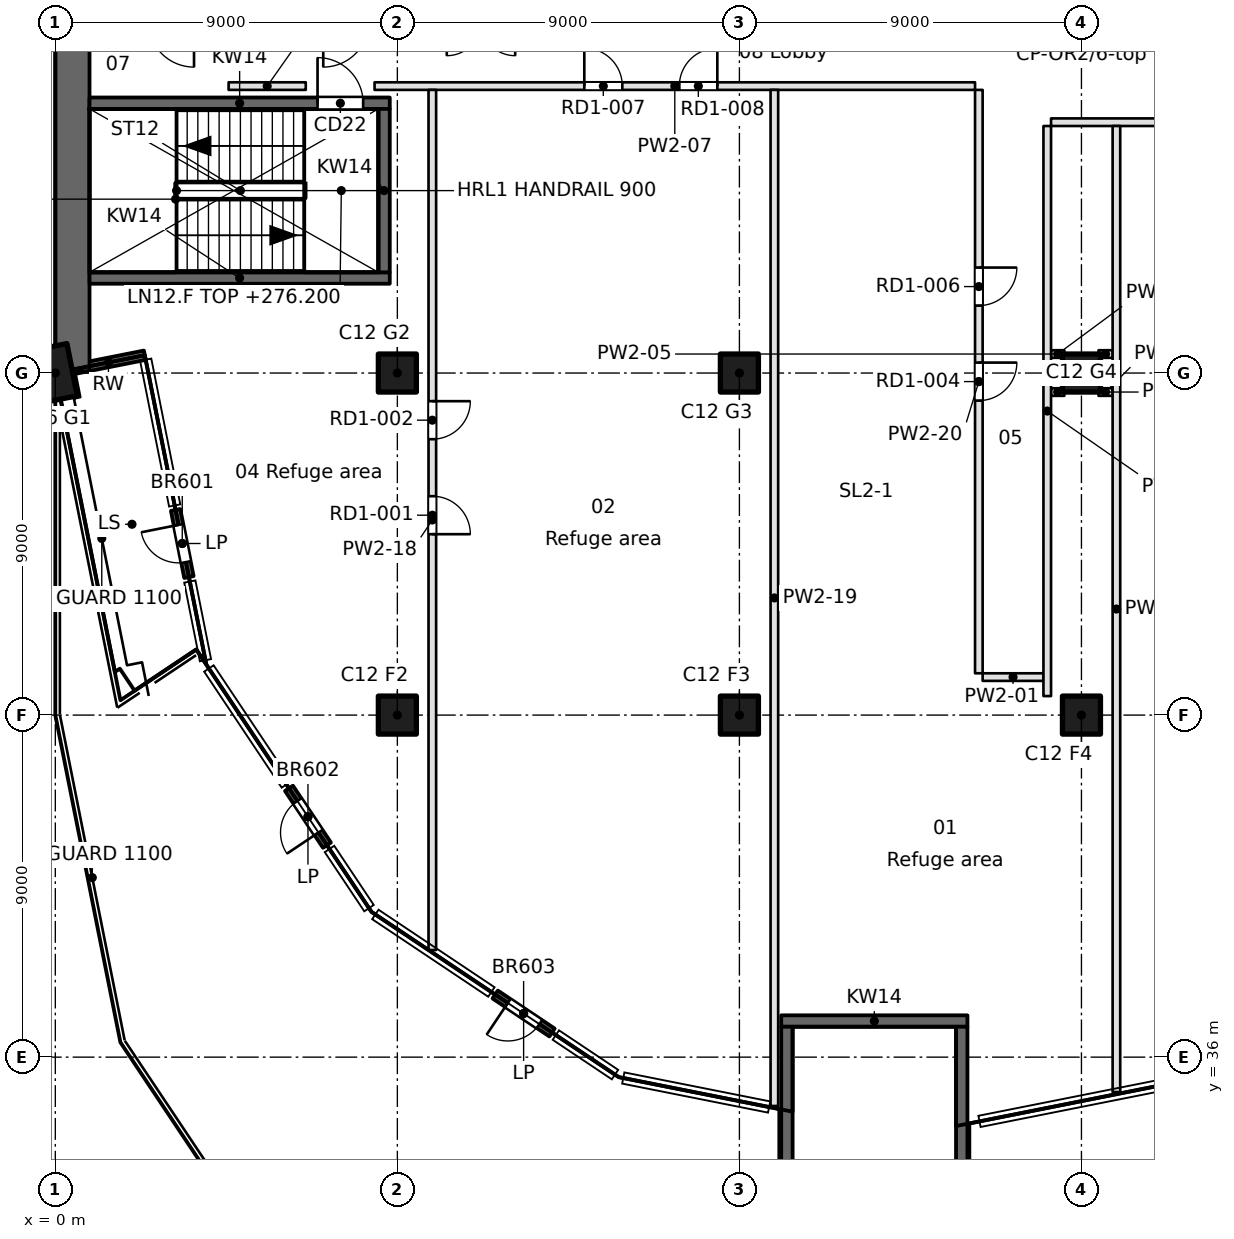
"""IFC4 building model, lengths in metres.
Left out: names, types, materials, properties, quantities, classifications, styles, units other than length and angle.
Written with IfcOpenShell. Run it as: python <this file> out.ifc"""

import sys

from ifc_helpers import new_model, si_unit, direction, frame, frame_2d, origin, origin_2d, place, context, subcontext, project, spatial, rectangle, extrude, element, fill, save


model = new_model("IFC4")
c1 = context("Model", 3, precision=1e-05, world=origin(), true_north=direction((0.0, 1.0)))
c2 = subcontext(c1, "Body", "Model", "MODEL_VIEW")
j1 = project(units=[si_unit("LENGTHUNIT", "METRE"), si_unit("PLANEANGLEUNIT", "RADIAN")], contexts=[c1])
p1 = place(None, origin())
s1 = spatial("IfcSite", under=j1, at=p1, CompositionType="ELEMENT")
p2 = place(p1, origin())
s2 = spatial("IfcBuilding", under=s1, at=p2, CompositionType="ELEMENT")
p3 = place(p2, frame((0.0, 0.0, 276.2)))
s3 = spatial("IfcBuildingStorey", under=s2, at=p3, CompositionType="ELEMENT", Elevation=276.2)
p4 = place(p3, frame((0.0, 54.0, 0.0), z_axis=(0.0, 0.0, 1.0), x_axis=(-0.195090322016, 0.980785280403, 0.0)))
e1 = element("IfcColumn", 1, at=p4, inside=s3, PredefinedType="COLUMN", context=c2, shape_type="SweptSolid", body=[
    extrude(rectangle(XDim=1.4, YDim=0.9, at=origin_2d()), origin(), (0.0, 0.0, 1.0), 4.6),
])
for number, where, z_axis, x_axis in (
    (2, (9.0, 45.0, 0.0), (0.0, 0.0, 1.0), (1.0, 0.0, 0.0)),
    (3, (9.0, 54.0, 0.0), (0.0, 0.0, 1.0), (1.0, 0.0, 0.0)),
    (4, (18.0, 45.0, 0.0), (0.0, 0.0, 1.0), (1.0, 0.0, 0.0)),
    (5, (18.0, 54.0, 0.0), (0.0, 0.0, 1.0), (1.0, 0.0, 0.0)),
    (6, (27.0, 45.0, 0.0), (0.0, 0.0, 1.0), (1.0, 0.0, 0.0)),
    (7, (27.0, 54.0, 0.0), (0.0, 0.0, 1.0), (1.0, 0.0, 0.0)),
):
    element("IfcColumn", number, at=place(p3, frame(where, z_axis=z_axis, x_axis=x_axis)), inside=s3, PredefinedType="COLUMN", context=c2, shape_type="SweptSolid", body=[
        extrude(rectangle(XDim=1.0, YDim=1.0, at=origin_2d()), origin(), (0.0, 0.0, 1.0), 4.6),
    ])
p5 = place(p3, frame((0.45, 94.5, 0.0), z_axis=(0.0, 0.0, 1.0), x_axis=(0.0, -1.0, 0.0)))
e8 = element("IfcWall", 8, at=p5, inside=s3, PredefinedType="SHEAR", context=c2, shape_type="SweptSolid", body=[
    extrude(rectangle(XDim=40.456, YDim=0.9, at=frame_2d((20.228, 0.0))), origin(), (0.0, 0.0, 1.0), 4.6),
])
p6 = place(p3, frame((0.441, 54.089, 0.0), z_axis=(0.0, 0.0, 1.0), x_axis=(0.980834936053, 0.194840519958, 0.0)))
e9 = element("IfcWall", 9, at=p6, inside=s3, PredefinedType="SOLIDWALL", context=c2, shape_type="SweptSolid", body=[
    extrude(rectangle(XDim=1.951, YDim=0.25, at=frame_2d((0.976, 0.0))), origin(), (0.0, 0.0, 1.0), 4.2),
])
p7 = place(p3, frame((3.165, 50.397, 0.0), z_axis=(0.0, 0.0, 1.0), x_axis=(0.19517704197, -0.980768026746, 0.0)))
e10 = element("IfcWall", 10, at=p7, inside=s3, PredefinedType="SOLIDWALL", context=c2, shape_type="SweptSolid", body=[
    extrude(rectangle(XDim=1.8, YDim=0.25, at=frame_2d((0.9, 0.0))), origin(), (0.0, 0.0, 1.0), 4.2),
])
p8 = place(p7, frame((0.4, 0.0, 0.0)))
e11 = element("IfcOpeningElement", 11, at=p8, cuts=e10, PredefinedType="OPENING", context=c2, shape_type="SweptSolid", body=[
    extrude(rectangle(XDim=1.0, YDim=2.1, at=frame_2d((0.5, 1.05))), frame((0.0, 0.125, 0.0), z_axis=(0.0, -1.0, 0.0), x_axis=(1.0, 0.0, 0.0)), (0.0, 0.0, 1.0), 0.25),
])
p9 = place(p3, frame((6.148, 43.074, 0.0), z_axis=(0.0, 0.0, 1.0), x_axis=(0.555576323502, -0.83146554274, 0.0)))
e12 = element("IfcWall", 12, at=p9, inside=s3, PredefinedType="SOLIDWALL", context=c2, shape_type="SweptSolid", body=[
    extrude(rectangle(XDim=1.8, YDim=0.25, at=frame_2d((0.9, 0.0))), origin(), (0.0, 0.0, 1.0), 4.2),
])
p10 = place(p9, frame((0.4, 0.0, 0.0)))
e13 = element("IfcOpeningElement", 13, at=p10, cuts=e12, PredefinedType="OPENING", context=c2, shape_type="SweptSolid", body=[
    extrude(rectangle(XDim=1.0, YDim=2.1, at=frame_2d((0.5, 1.05))), frame((0.0, 0.125, 0.0), z_axis=(0.0, -1.0, 0.0), x_axis=(1.0, 0.0, 0.0)), (0.0, 0.0, 1.0), 0.25),
])
p11 = place(p3, frame((11.574, 37.648, 0.0), z_axis=(0.0, 0.0, 1.0), x_axis=(0.83146554274, -0.555576323502, 0.0)))
e14 = element("IfcWall", 14, at=p11, inside=s3, PredefinedType="SOLIDWALL", context=c2, shape_type="SweptSolid", body=[
    extrude(rectangle(XDim=1.8, YDim=0.25, at=frame_2d((0.9, 0.0))), origin(), (0.0, 0.0, 1.0), 4.2),
])
p12 = place(p11, frame((0.4, 0.0, 0.0)))
e15 = element("IfcOpeningElement", 15, at=p12, cuts=e14, PredefinedType="OPENING", context=c2, shape_type="SweptSolid", body=[
    extrude(rectangle(XDim=1.0, YDim=2.1, at=frame_2d((0.5, 1.05))), frame((0.0, 0.125, 0.0), z_axis=(0.0, -1.0, 0.0), x_axis=(1.0, 0.0, 0.0)), (0.0, 0.0, 1.0), 0.25),
])
p13 = place(p3, frame((19.1, 36.95, -0.45), z_axis=(0.0, 0.0, 1.0), x_axis=(1.0, 0.0, 0.0)))
e16 = element("IfcWall", 16, at=p13, inside=s3, PredefinedType="SOLIDWALL", context=c2, shape_type="SweptSolid", body=[
    extrude(rectangle(XDim=4.9, YDim=0.3, at=frame_2d((2.45, 0.0))), origin(), (0.0, 0.0, 1.0), 4.65),
])
p14 = place(p3, frame((0.9, 56.5, -0.45), z_axis=(0.0, 0.0, 1.0), x_axis=(1.0, 0.0, 0.0)))
e17 = element("IfcWall", 17, at=p14, inside=s3, PredefinedType="SOLIDWALL", context=c2, shape_type="SweptSolid", body=[
    extrude(rectangle(XDim=7.9, YDim=0.3, at=frame_2d((3.95, 0.0))), origin(), (0.0, 0.0, 1.0), 4.65),
])
p15 = place(p3, frame((0.9, 61.1, -0.45), z_axis=(0.0, 0.0, 1.0), x_axis=(1.0, 0.0, 0.0)))
e18 = element("IfcWall", 18, at=p15, inside=s3, PredefinedType="SOLIDWALL", context=c2, shape_type="SweptSolid", body=[
    extrude(rectangle(XDim=7.9, YDim=0.3, at=frame_2d((3.95, 0.0))), origin(), (0.0, 0.0, 1.0), 4.65),
])
p16 = place(p15, frame((6.0, 0.0, 0.45)))
e19 = element("IfcOpeningElement", 19, at=p16, cuts=e18, PredefinedType="OPENING", context=c2, shape_type="SweptSolid", body=[
    extrude(rectangle(XDim=1.2, YDim=2.1, at=frame_2d((0.6, 1.05))), frame((0.0, 0.15, 0.0), z_axis=(0.0, -1.0, 0.0), x_axis=(1.0, 0.0, 0.0)), (0.0, 0.0, 1.0), 0.3),
])
p17 = place(p3, frame((8.65, 56.65, -0.45), z_axis=(0.0, 0.0, 1.0), x_axis=(0.0, 1.0, 0.0)))
e20 = element("IfcWall", 20, at=p17, inside=s3, PredefinedType="SOLIDWALL", context=c2, shape_type="SweptSolid", body=[
    extrude(rectangle(XDim=4.3, YDim=0.3, at=frame_2d((2.15, 0.0))), origin(), (0.0, 0.0, 1.0), 4.65),
])
p18 = place(p3, frame((19.25, 29.2, -0.45), z_axis=(0.0, 0.0, 1.0), x_axis=(0.0, 1.0, 0.0)))
e21 = element("IfcWall", 21, at=p18, inside=s3, PredefinedType="SOLIDWALL", context=c2, shape_type="SweptSolid", body=[
    extrude(rectangle(XDim=7.6, YDim=0.3, at=frame_2d((3.8, 0.0))), origin(), (0.0, 0.0, 1.0), 4.65),
])
p19 = place(p3, frame((23.85, 29.2, -0.45), z_axis=(0.0, 0.0, 1.0), x_axis=(0.0, 1.0, 0.0)))
e22 = element("IfcWall", 22, at=p19, inside=s3, PredefinedType="SOLIDWALL", context=c2, shape_type="SweptSolid", body=[
    extrude(rectangle(XDim=7.6, YDim=0.3, at=frame_2d((3.8, 0.0))), origin(), (0.0, 0.0, 1.0), 4.65),
])
p20 = place(p19, frame((0.375, 0.0, 0.45)))
e23 = element("IfcOpeningElement", 23, at=p20, cuts=e22, PredefinedType="OPENING", context=c2, shape_type="SweptSolid", body=[
    extrude(rectangle(XDim=1.2, YDim=2.1, at=frame_2d((0.6, 1.05))), frame((0.0, 0.15, 0.0), z_axis=(0.0, -1.0, 0.0), x_axis=(1.0, 0.0, 0.0)), (0.0, 0.0, 1.0), 0.3),
])
p21 = place(p3, frame((26.0, 46.0, 0.0), z_axis=(0.0, 0.0, 1.0), x_axis=(-1.0, 0.0, 0.0)))
e24 = element("IfcWall", 24, at=p21, inside=s3, PredefinedType="PARTITIONING", context=c2, shape_type="SweptSolid", body=[
    extrude(rectangle(XDim=1.6, YDim=0.2, at=frame_2d((0.8, 0.0))), origin(), (0.0, 0.0, 1.0), 4.2),
])
p22 = place(p3, frame((26.2, 53.5, 0.0), z_axis=(0.0, 0.0, 1.0), x_axis=(1.0, 0.0, 0.0)))
e25 = element("IfcWall", 25, at=p22, inside=s3, PredefinedType="PARTITIONING", context=c2, shape_type="SweptSolid", body=[
    extrude(rectangle(XDim=0.35, YDim=0.2, at=frame_2d((0.175, 0.0))), origin(), (0.0, 0.0, 1.0), 4.2),
])
p23 = place(p3, frame((27.45, 53.5, 0.0), z_axis=(0.0, 0.0, 1.0), x_axis=(1.0, 0.0, 0.0)))
e26 = element("IfcWall", 26, at=p23, inside=s3, PredefinedType="PARTITIONING", context=c2, shape_type="SweptSolid", body=[
    extrude(rectangle(XDim=0.37, YDim=0.2, at=frame_2d((0.185, 0.0))), origin(), (0.0, 0.0, 1.0), 4.2),
])
p24 = place(p3, frame((26.2, 54.5, 0.0), z_axis=(0.0, 0.0, 1.0), x_axis=(1.0, 0.0, 0.0)))
e27 = element("IfcWall", 27, at=p24, inside=s3, PredefinedType="PARTITIONING", context=c2, shape_type="SweptSolid", body=[
    extrude(rectangle(XDim=0.35, YDim=0.2, at=frame_2d((0.175, 0.0))), origin(), (0.0, 0.0, 1.0), 4.2),
])
p25 = place(p3, frame((27.45, 54.5, 0.0), z_axis=(0.0, 0.0, 1.0), x_axis=(1.0, 0.0, 0.0)))
e28 = element("IfcWall", 28, at=p25, inside=s3, PredefinedType="PARTITIONING", context=c2, shape_type="SweptSolid", body=[
    extrude(rectangle(XDim=0.37, YDim=0.2, at=frame_2d((0.185, 0.0))), origin(), (0.0, 0.0, 1.0), 4.2),
])
p26 = place(p3, frame((40.611, 60.6, 0.0), z_axis=(0.0, 0.0, 1.0), x_axis=(-1.0, 0.0, 0.0)))
e29 = element("IfcWall", 29, at=p26, inside=s3, PredefinedType="PARTITIONING", context=c2, shape_type="SweptSolid", body=[
    extrude(rectangle(XDim=14.411, YDim=0.2, at=frame_2d((7.206, 0.0))), origin(), (0.0, 0.0, 1.0), 4.2),
])
p27 = place(p3, frame((24.2, 61.55, 0.0), z_axis=(0.0, 0.0, 1.0), x_axis=(-1.0, 0.0, 0.0)))
e30 = element("IfcWall", 30, at=p27, inside=s3, PredefinedType="PARTITIONING", context=c2, shape_type="SweptSolid", body=[
    extrude(rectangle(XDim=15.8, YDim=0.2, at=frame_2d((7.9, 0.0))), origin(), (0.0, 0.0, 1.0), 4.2),
])
p28 = place(p27, frame((9.281, 0.0, 0.0)))
e31 = element("IfcOpeningElement", 31, at=p28, cuts=e30, PredefinedType="OPENING", context=c2, shape_type="SweptSolid", body=[
    extrude(rectangle(XDim=1.0, YDim=2.1, at=frame_2d((0.5, 1.05))), frame((0.0, 0.1, 0.0), z_axis=(0.0, -1.0, 0.0), x_axis=(1.0, 0.0, 0.0)), (0.0, 0.0, 1.0), 0.2),
])
p29 = place(p27, frame((6.781, 0.0, 0.0)))
e32 = element("IfcOpeningElement", 32, at=p29, cuts=e30, PredefinedType="OPENING", context=c2, shape_type="SweptSolid", body=[
    extrude(rectangle(XDim=1.0, YDim=2.1, at=frame_2d((0.5, 1.05))), frame((0.0, 0.1, 0.0), z_axis=(0.0, -1.0, 0.0), x_axis=(1.0, 0.0, 0.0)), (0.0, 0.0, 1.0), 0.2),
])
p30 = place(p3, frame((6.59, 61.55, 0.0), z_axis=(0.0, 0.0, 1.0), x_axis=(-1.0, 0.0, 0.0)))
e33 = element("IfcWall", 33, at=p30, inside=s3, PredefinedType="PARTITIONING", context=c2, shape_type="SweptSolid", body=[
    extrude(rectangle(XDim=2.03, YDim=0.2, at=frame_2d((1.015, 0.0))), origin(), (0.0, 0.0, 1.0), 4.2),
])
p31 = place(p3, frame((9.92, 38.818, 0.0), z_axis=(0.0, 0.0, 1.0), x_axis=(0.0, 1.0, 0.0)))
e34 = element("IfcWall", 34, at=p31, inside=s3, PredefinedType="PARTITIONING", context=c2, shape_type="SweptSolid", body=[
    extrude(rectangle(XDim=22.632, YDim=0.2, at=frame_2d((11.316, 0.0))), origin(), (0.0, 0.0, 1.0), 4.2),
])
p32 = place(p31, frame((10.942, 0.0, 0.0)))
e35 = element("IfcOpeningElement", 35, at=p32, cuts=e34, PredefinedType="OPENING", context=c2, shape_type="SweptSolid", body=[
    extrude(rectangle(XDim=1.0, YDim=2.1, at=frame_2d((0.5, 1.05))), frame((0.0, 0.1, 0.0), z_axis=(0.0, -1.0, 0.0), x_axis=(1.0, 0.0, 0.0)), (0.0, 0.0, 1.0), 0.2),
])
p33 = place(p31, frame((13.442, 0.0, 0.0)))
e36 = element("IfcOpeningElement", 36, at=p33, cuts=e34, PredefinedType="OPENING", context=c2, shape_type="SweptSolid", body=[
    extrude(rectangle(XDim=1.0, YDim=2.1, at=frame_2d((0.5, 1.05))), frame((0.0, 0.1, 0.0), z_axis=(0.0, -1.0, 0.0), x_axis=(1.0, 0.0, 0.0)), (0.0, 0.0, 1.0), 0.2),
])
p34 = place(p3, frame((18.92, 61.45, 0.0), z_axis=(0.0, 0.0, 1.0), x_axis=(0.0, -1.0, 0.0)))
e37 = element("IfcWall", 37, at=p34, inside=s3, PredefinedType="PARTITIONING", context=c2, shape_type="SweptSolid", body=[
    extrude(rectangle(XDim=26.735, YDim=0.2, at=frame_2d((13.367, 0.0))), origin(), (0.0, 0.0, 1.0), 4.2),
])
p35 = place(p3, frame((24.3, 46.1, 0.0), z_axis=(0.0, 0.0, 1.0), x_axis=(0.0, 1.0, 0.0)))
e38 = element("IfcWall", 38, at=p35, inside=s3, PredefinedType="PARTITIONING", context=c2, shape_type="SweptSolid", body=[
    extrude(rectangle(XDim=15.35, YDim=0.2, at=frame_2d((7.675, 0.0))), origin(), (0.0, 0.0, 1.0), 4.2),
])
p36 = place(p35, frame((7.175, 0.0, 0.0)))
e39 = element("IfcOpeningElement", 39, at=p36, cuts=e38, PredefinedType="OPENING", context=c2, shape_type="SweptSolid", body=[
    extrude(rectangle(XDim=1.0, YDim=2.1, at=frame_2d((0.5, 1.05))), frame((0.0, 0.1, 0.0), z_axis=(0.0, -1.0, 0.0), x_axis=(1.0, 0.0, 0.0)), (0.0, 0.0, 1.0), 0.2),
])
p37 = place(p35, frame((9.675, 0.0, 0.0)))
e40 = element("IfcOpeningElement", 40, at=p37, cuts=e38, PredefinedType="OPENING", context=c2, shape_type="SweptSolid", body=[
    extrude(rectangle(XDim=1.0, YDim=2.1, at=frame_2d((0.5, 1.05))), frame((0.0, 0.1, 0.0), z_axis=(0.0, -1.0, 0.0), x_axis=(1.0, 0.0, 0.0)), (0.0, 0.0, 1.0), 0.2),
])
p38 = place(p3, frame((26.1, 60.5, 0.0), z_axis=(0.0, 0.0, 1.0), x_axis=(0.0, -1.0, 0.0)))
e41 = element("IfcWall", 41, at=p38, inside=s3, PredefinedType="PARTITIONING", context=c2, shape_type="SweptSolid", body=[
    extrude(rectangle(XDim=15.0, YDim=0.2, at=frame_2d((7.5, 0.0))), origin(), (0.0, 0.0, 1.0), 4.2),
])
p39 = place(p3, frame((27.92, 60.5, 0.0), z_axis=(0.0, 0.0, 1.0), x_axis=(0.0, -1.0, 0.0)))
e42 = element("IfcWall", 42, at=p39, inside=s3, PredefinedType="PARTITIONING", context=c2, shape_type="SweptSolid", body=[
    extrude(rectangle(XDim=25.419, YDim=0.2, at=frame_2d((12.709, 0.0))), origin(), (0.0, 0.0, 1.0), 4.2),
])
p40 = place(p8, frame((1.0, 0.0, 0.0), z_axis=(0.0, 0.0, 1.0), x_axis=(-1.0, 0.0, 0.0)))
e43 = element("IfcDoor", 43, at=p40, inside=s3, OperationType="SINGLE_SWING_RIGHT", PredefinedType="DOOR", context=c2, shape_type="SweptSolid", body=[
    extrude(rectangle(XDim=1.0, YDim=2.1, at=frame_2d((0.5, 1.05))), frame((0.0, 0.025, 0.0), z_axis=(0.0, -1.0, 0.0), x_axis=(1.0, 0.0, 0.0)), (0.0, 0.0, 1.0), 0.05),
])
fill(e11, e43)
p41 = place(p10, frame((1.0, 0.0, 0.0), z_axis=(0.0, 0.0, 1.0), x_axis=(-1.0, 0.0, 0.0)))
e44 = element("IfcDoor", 44, at=p41, inside=s3, OperationType="SINGLE_SWING_LEFT", PredefinedType="DOOR", context=c2, shape_type="SweptSolid", body=[
    extrude(rectangle(XDim=1.0, YDim=2.1, at=frame_2d((0.5, 1.05))), frame((0.0, 0.025, 0.0), z_axis=(0.0, -1.0, 0.0), x_axis=(1.0, 0.0, 0.0)), (0.0, 0.0, 1.0), 0.05),
])
fill(e13, e44)
p42 = place(p12, frame((1.0, 0.0, 0.0), z_axis=(0.0, 0.0, 1.0), x_axis=(-1.0, 0.0, 0.0)))
e45 = element("IfcDoor", 45, at=p42, inside=s3, OperationType="SINGLE_SWING_RIGHT", PredefinedType="DOOR", context=c2, shape_type="SweptSolid", body=[
    extrude(rectangle(XDim=1.0, YDim=2.1, at=frame_2d((0.5, 1.05))), frame((0.0, 0.025, 0.0), z_axis=(0.0, -1.0, 0.0), x_axis=(1.0, 0.0, 0.0)), (0.0, 0.0, 1.0), 0.05),
])
fill(e15, e45)
p43 = place(p16, origin())
e46 = element("IfcDoor", 46, at=p43, inside=s3, OperationType="SINGLE_SWING_LEFT", PredefinedType="DOOR", context=c2, shape_type="SweptSolid", body=[
    extrude(rectangle(XDim=1.2, YDim=2.1, at=frame_2d((0.6, 1.05))), frame((0.0, 0.025, 0.0), z_axis=(0.0, -1.0, 0.0), x_axis=(1.0, 0.0, 0.0)), (0.0, 0.0, 1.0), 0.05),
])
fill(e19, e46)
p44 = place(p32, frame((1.0, 0.0, 0.0), z_axis=(0.0, 0.0, 1.0), x_axis=(-1.0, 0.0, 0.0)))
e47 = element("IfcDoor", 47, at=p44, inside=s3, OperationType="SINGLE_SWING_RIGHT", PredefinedType="DOOR", context=c2, shape_type="SweptSolid", body=[
    extrude(rectangle(XDim=1.0, YDim=2.1, at=frame_2d((0.5, 1.05))), frame((0.0, 0.025, 0.0), z_axis=(0.0, -1.0, 0.0), x_axis=(1.0, 0.0, 0.0)), (0.0, 0.0, 1.0), 0.05),
])
fill(e35, e47)
p45 = place(p33, frame((1.0, 0.0, 0.0), z_axis=(0.0, 0.0, 1.0), x_axis=(-1.0, 0.0, 0.0)))
e48 = element("IfcDoor", 48, at=p45, inside=s3, OperationType="SINGLE_SWING_LEFT", PredefinedType="DOOR", context=c2, shape_type="SweptSolid", body=[
    extrude(rectangle(XDim=1.0, YDim=2.1, at=frame_2d((0.5, 1.05))), frame((0.0, 0.025, 0.0), z_axis=(0.0, -1.0, 0.0), x_axis=(1.0, 0.0, 0.0)), (0.0, 0.0, 1.0), 0.05),
])
fill(e36, e48)
p46 = place(p36, frame((1.0, 0.0, 0.0), z_axis=(0.0, 0.0, 1.0), x_axis=(-1.0, 0.0, 0.0)))
e49 = element("IfcDoor", 49, at=p46, inside=s3, OperationType="SINGLE_SWING_LEFT", PredefinedType="DOOR", context=c2, shape_type="SweptSolid", body=[
    extrude(rectangle(XDim=1.0, YDim=2.1, at=frame_2d((0.5, 1.05))), frame((0.0, 0.025, 0.0), z_axis=(0.0, -1.0, 0.0), x_axis=(1.0, 0.0, 0.0)), (0.0, 0.0, 1.0), 0.05),
])
fill(e39, e49)
p47 = place(p37, frame((1.0, 0.0, 0.0), z_axis=(0.0, 0.0, 1.0), x_axis=(-1.0, 0.0, 0.0)))
e50 = element("IfcDoor", 50, at=p47, inside=s3, OperationType="SINGLE_SWING_LEFT", PredefinedType="DOOR", context=c2, shape_type="SweptSolid", body=[
    extrude(rectangle(XDim=1.0, YDim=2.1, at=frame_2d((0.5, 1.05))), frame((0.0, 0.025, 0.0), z_axis=(0.0, -1.0, 0.0), x_axis=(1.0, 0.0, 0.0)), (0.0, 0.0, 1.0), 0.05),
])
fill(e40, e50)
p48 = place(p28, frame((1.0, 0.0, 0.0), z_axis=(0.0, 0.0, 1.0), x_axis=(-1.0, 0.0, 0.0)))
e51 = element("IfcDoor", 51, at=p48, inside=s3, OperationType="SINGLE_SWING_LEFT", PredefinedType="DOOR", context=c2, shape_type="SweptSolid", body=[
    extrude(rectangle(XDim=1.0, YDim=2.1, at=frame_2d((0.5, 1.05))), frame((0.0, 0.025, 0.0), z_axis=(0.0, -1.0, 0.0), x_axis=(1.0, 0.0, 0.0)), (0.0, 0.0, 1.0), 0.05),
])
fill(e31, e51)
p49 = place(p29, frame((1.0, 0.0, 0.0), z_axis=(0.0, 0.0, 1.0), x_axis=(-1.0, 0.0, 0.0)))
e52 = element("IfcDoor", 52, at=p49, inside=s3, OperationType="SINGLE_SWING_RIGHT", PredefinedType="DOOR", context=c2, shape_type="SweptSolid", body=[
    extrude(rectangle(XDim=1.0, YDim=2.1, at=frame_2d((0.5, 1.05))), frame((0.0, 0.025, 0.0), z_axis=(0.0, -1.0, 0.0), x_axis=(1.0, 0.0, 0.0)), (0.0, 0.0, 1.0), 0.05),
])
fill(e32, e52)
save(model, sys.argv[1])
